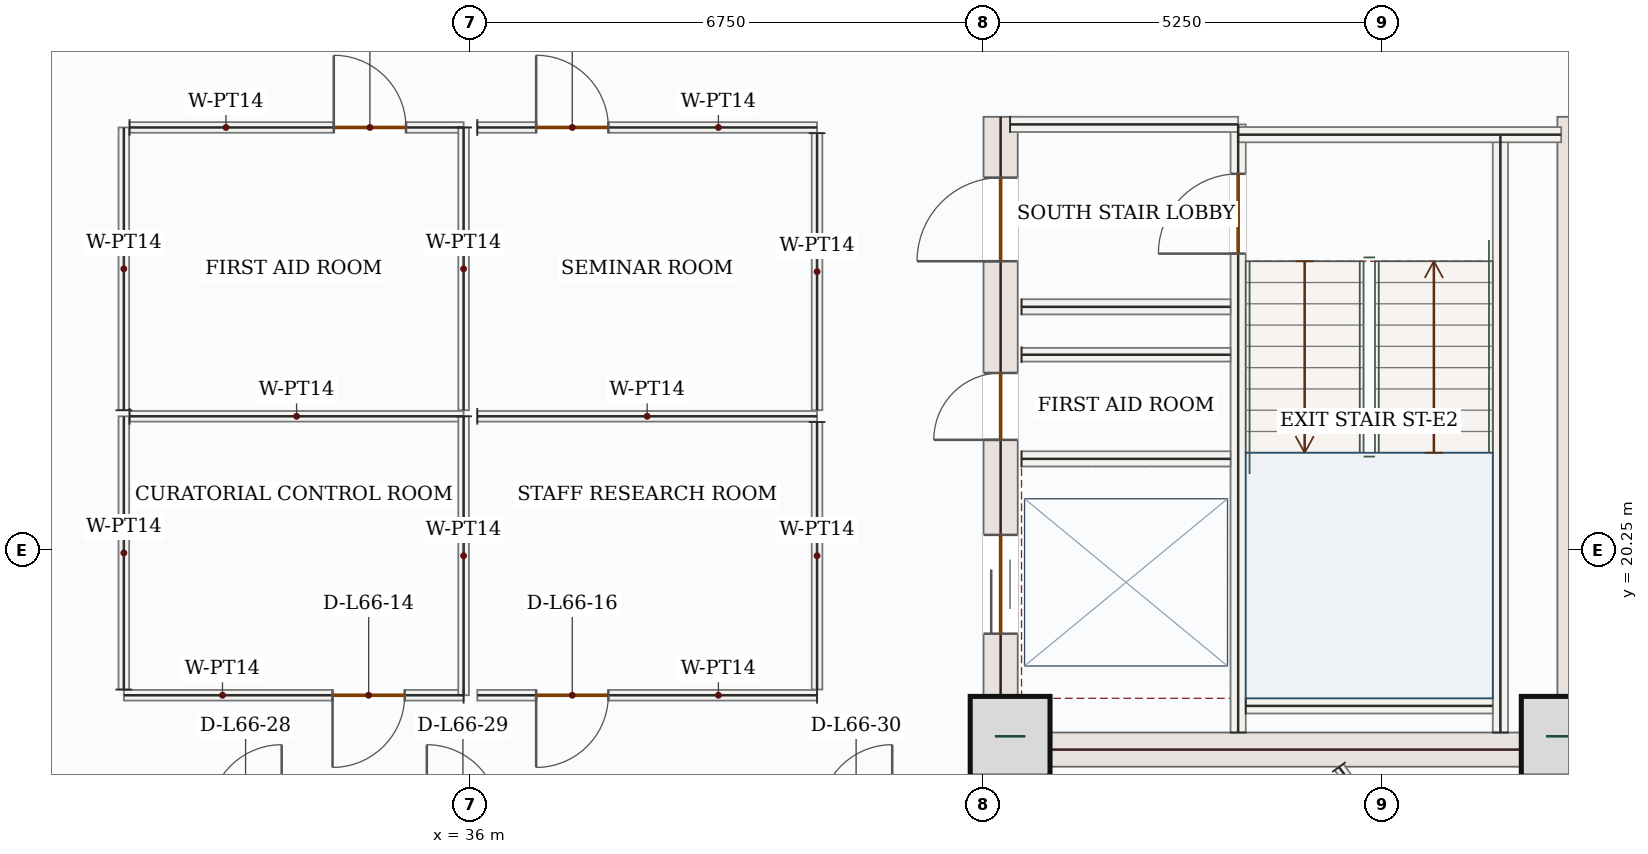
"""IFC4 building model, lengths in metres.
Left out: names, types, materials, properties, quantities, classifications, styles, units other than length and angle.
Written with IfcOpenShell. Run it as: python <this file> out.ifc"""

import sys

from ifc_helpers import new_model, si_unit, direction, frame, frame_2d, origin, origin_2d, place, context, subcontext, project, spatial, rectangle, extrude, source, transform, mapped, element, fill, save


model = new_model("IFC4")
c1 = context("Model", 3, precision=1e-05, world=origin(), true_north=direction((0.0, 1.0)))
c2 = subcontext(c1, "Body", "Model", "MODEL_VIEW")
j1 = project(units=[si_unit("LENGTHUNIT", "METRE"), si_unit("PLANEANGLEUNIT", "RADIAN")], contexts=[c1])
p1 = place(None, origin())
s1 = spatial("IfcSite", under=j1, at=p1, CompositionType="ELEMENT")
p2 = place(p1, origin())
s2 = spatial("IfcBuilding", under=s1, at=p2, CompositionType="ELEMENT")
p3 = place(p2, frame((0.0, 0.0, 276.6)))
s3 = spatial("IfcBuildingStorey", under=s2, at=p3, CompositionType="ELEMENT", Elevation=276.6)
p4 = place(p3, frame((42.975, 17.4, 0.0), z_axis=(0.0, 0.0, 1.0), x_axis=(0.0, 1.0, 0.0)))
e1 = element("IfcWall", 1, at=p4, inside=s3, PredefinedType="SHEAR", context=c2, shape_type="SweptSolid", body=[
    extrude(rectangle(XDim=8.55, YDim=0.45, at=frame_2d((4.275, 0.0))), origin(), (0.0, 0.0, 1.0), 3.5),
])
p5 = place(p4, frame((6.65, 0.0, 0.0)))
e2 = element("IfcOpeningElement", 2, at=p5, cuts=e1, PredefinedType="OPENING", context=c2, shape_type="SweptSolid", body=[
    extrude(rectangle(XDim=1.1, YDim=2.2, at=frame_2d((0.55, 1.1))), frame((0.0, 0.235, 0.0), z_axis=(0.0, -1.0, 0.0), x_axis=(1.0, 0.0, 0.0)), (0.0, 0.0, 1.0), 0.47),
])
p6 = place(p4, frame((1.75, 0.0, 0.0)))
e3 = element("IfcOpeningElement", 3, at=p6, cuts=e1, PredefinedType="OPENING", context=c2, shape_type="SweptSolid", body=[
    extrude(rectangle(XDim=1.3, YDim=2.2, at=frame_2d((0.65, 1.1))), frame((0.0, 0.235, 0.0), z_axis=(0.0, -1.0, 0.0), x_axis=(1.0, 0.0, 0.0)), (0.0, 0.0, 1.0), 0.47),
])
p7 = place(p4, frame((4.3, 0.0, 0.0)))
e4 = element("IfcOpeningElement", 4, at=p7, cuts=e1, PredefinedType="OPENING", context=c2, shape_type="SweptSolid", body=[
    extrude(rectangle(XDim=0.88, YDim=2.1, at=frame_2d((0.44, 1.05))), frame((0.0, 0.235, 0.0), z_axis=(0.0, -1.0, 0.0), x_axis=(1.0, 0.0, 0.0)), (0.0, 0.0, 1.0), 0.47),
])
m1 = source(origin(), c2, "Body", "SweptSolid", [
    extrude(rectangle(XDim=8.55, YDim=0.45, at=frame_2d((4.275, 0.0))), origin(), (0.0, 0.0, 1.0), 3.5),
])
p8 = place(p3, frame((50.525, 17.4, 0.0), z_axis=(0.0, 0.0, 1.0), x_axis=(0.0, 1.0, 0.0)))
e5 = element("IfcWall", 5, at=p8, inside=s3, PredefinedType="SHEAR", context=c2, shape_type="MappedRepresentation", body=[
    mapped(m1, transform((0.0, 0.0, 0.0), x_axis=(1.0, 0.0, 0.0), y_axis=(0.0, 1.0, 0.0), z_axis=(0.0, 0.0, 1.0), scale=1.0)),
])
m2 = source(origin(), c2, "Body", "SweptSolid", [
    extrude(rectangle(XDim=7.1, YDim=0.45, at=frame_2d((3.55, 0.0))), origin(), (0.0, 0.0, 1.0), 3.5),
])
p9 = place(p3, frame((43.2, 17.625, 0.0), z_axis=(0.0, 0.0, 1.0), x_axis=(1.0, 0.0, 0.0)))
e6 = element("IfcWall", 6, at=p9, inside=s3, PredefinedType="SHEAR", context=c2, shape_type="MappedRepresentation", body=[
    mapped(m2, transform((0.0, 0.0, 0.0), x_axis=(1.0, 0.0, 0.0), y_axis=(0.0, 1.0, 0.0), z_axis=(0.0, 0.0, 1.0), scale=1.0)),
])
m3 = source(origin(), c2, "Body", "SweptSolid", [
    extrude(rectangle(XDim=1.05, YDim=1.05, at=origin_2d()), origin(), (0.0, 0.0, 1.0), 3.75),
])
for number, where, z_axis, x_axis in (
    (7, (43.1, 17.8, 0.0), (0.0, 0.0, 1.0), (1.0, 0.0, 0.0)),
    (8, (50.35, 17.8, 0.0), (0.0, 0.0, 1.0), (1.0, 0.0, 0.0)),
):
    element("IfcColumn", number, at=place(p3, frame(where, z_axis=z_axis, x_axis=x_axis)), inside=s3, PredefinedType="COLUMN", context=c2, shape_type="MappedRepresentation", body=[
        mapped(m3, transform((0.0, 0.0, 0.0), x_axis=(1.0, 0.0, 0.0), y_axis=(0.0, 1.0, 0.0), z_axis=(0.0, 0.0, 1.0), scale=1.0)),
    ])
m4 = source(origin(), c2, "Body", "SweptSolid", [
    extrude(rectangle(XDim=7.87, YDim=0.2, at=frame_2d((3.935, 0.0))), origin(), (0.0, 0.0, 1.0), 3.5),
])
p10 = place(p3, frame((49.55, 17.85, 0.0), z_axis=(0.0, 0.0, 1.0), x_axis=(0.0, 1.0, 0.0)))
e9 = element("IfcWall", 9, at=p10, inside=s3, PredefinedType="SOLIDWALL", context=c2, shape_type="MappedRepresentation", body=[
    mapped(m4, transform((0.0, 0.0, 0.0), x_axis=(1.0, 0.0, 0.0), y_axis=(0.0, 1.0, 0.0), z_axis=(0.0, 0.0, 1.0), scale=1.0)),
])
p11 = place(p3, frame((46.1, 17.85, 0.0), z_axis=(0.0, 0.0, 1.0), x_axis=(0.0, 1.0, 0.0)))
e10 = element("IfcWall", 10, at=p11, inside=s3, PredefinedType="SOLIDWALL", context=c2, shape_type="SweptSolid", body=[
    extrude(rectangle(XDim=8.0, YDim=0.2, at=frame_2d((4.0, 0.0))), origin(), (0.0, 0.0, 1.0), 3.5),
])
p12 = place(p11, frame((6.3, 0.0, 0.0)))
e11 = element("IfcOpeningElement", 11, at=p12, cuts=e10, PredefinedType="OPENING", context=c2, shape_type="SweptSolid", body=[
    extrude(rectangle(XDim=1.05, YDim=2.15, at=frame_2d((0.525, 1.075))), frame((0.0, 0.11, 0.0), z_axis=(0.0, -1.0, 0.0), x_axis=(1.0, 0.0, 0.0)), (0.0, 0.0, 1.0), 0.22),
])
m5 = source(origin(), c2, "Body", "SweptSolid", [
    extrude(rectangle(XDim=3.0, YDim=0.2, at=frame_2d((1.5, 0.0))), origin(), (0.0, 0.0, 1.0), 3.5),
])
p13 = place(p3, frame((43.1, 25.85, 0.0), z_axis=(0.0, 0.0, 1.0), x_axis=(1.0, 0.0, 0.0)))
e12 = element("IfcWall", 12, at=p13, inside=s3, PredefinedType="SOLIDWALL", context=c2, shape_type="MappedRepresentation", body=[
    mapped(m5, transform((0.0, 0.0, 0.0), x_axis=(1.0, 0.0, 0.0), y_axis=(0.0, 1.0, 0.0), z_axis=(0.0, 0.0, 1.0), scale=1.0)),
])
m6 = source(origin(), c2, "Body", "SweptSolid", [
    extrude(rectangle(XDim=4.25, YDim=0.2, at=frame_2d((2.125, 0.0))), origin(), (0.0, 0.0, 1.0), 3.5),
])
p14 = place(p3, frame((46.1, 25.715, 0.0), z_axis=(0.0, 0.0, 1.0), x_axis=(1.0, 0.0, 0.0)))
e13 = element("IfcWall", 13, at=p14, inside=s3, PredefinedType="SOLIDWALL", context=c2, shape_type="MappedRepresentation", body=[
    mapped(m6, transform((0.0, 0.0, 0.0), x_axis=(1.0, 0.0, 0.0), y_axis=(0.0, 1.0, 0.0), z_axis=(0.0, 0.0, 1.0), scale=1.0)),
])
m7 = source(origin(), c2, "Body", "SweptSolid", [
    extrude(rectangle(XDim=3.25, YDim=0.2, at=frame_2d((1.625, 0.0))), origin(), (0.0, 0.0, 1.0), 3.5),
])
p15 = place(p3, frame((46.2, 18.2, 0.0), z_axis=(0.0, 0.0, 1.0), x_axis=(1.0, 0.0, 0.0)))
e14 = element("IfcWall", 14, at=p15, inside=s3, PredefinedType="SOLIDWALL", context=c2, shape_type="MappedRepresentation", body=[
    mapped(m7, transform((0.0, 0.0, 0.0), x_axis=(1.0, 0.0, 0.0), y_axis=(0.0, 1.0, 0.0), z_axis=(0.0, 0.0, 1.0), scale=1.0)),
])
m8 = source(origin(), c2, "Body", "SweptSolid", [
    extrude(rectangle(XDim=2.75, YDim=0.2, at=frame_2d((1.375, 0.0))), origin(), (0.0, 0.0, 1.0), 3.5),
])
for number, where, z_axis, x_axis in (
    (15, (43.25, 23.45, 0.0), (0.0, 0.0, 1.0), (1.0, 0.0, 0.0)),
    (16, (43.25, 21.45, 0.0), (0.0, 0.0, 1.0), (1.0, 0.0, 0.0)),
):
    element("IfcWall", number, at=place(p3, frame(where, z_axis=z_axis, x_axis=x_axis)), inside=s3, PredefinedType="SOLIDWALL", context=c2, shape_type="MappedRepresentation", body=[
        mapped(m8, transform((0.0, 0.0, 0.0), x_axis=(1.0, 0.0, 0.0), y_axis=(0.0, 1.0, 0.0), z_axis=(0.0, 0.0, 1.0), scale=1.0)),
    ])
m9 = source(origin(), c2, "Body", "SweptSolid", [
    extrude(rectangle(XDim=2.75, YDim=0.18, at=frame_2d((1.375, 0.0))), origin(), (0.0, 0.0, 1.0), 3.5),
])
p16 = place(p3, frame((43.25, 22.82, 0.0), z_axis=(0.0, 0.0, 1.0), x_axis=(1.0, 0.0, 0.0)))
e17 = element("IfcWall", 17, at=p16, inside=s3, PredefinedType="PARTITIONING", context=c2, shape_type="MappedRepresentation", body=[
    mapped(m9, transform((0.0, 0.0, 0.0), x_axis=(1.0, 0.0, 0.0), y_axis=(0.0, 1.0, 0.0), z_axis=(0.0, 0.0, 1.0), scale=1.0)),
])
p17 = place(p3, frame((35.91, 18.34, 0.0), z_axis=(0.0, 0.0, 1.0), x_axis=(-1.0, 0.0, 0.0)))
e18 = element("IfcWall", 18, at=p17, inside=s3, PredefinedType="PARTITIONING", context=c2, shape_type="SweptSolid", body=[
    extrude(rectangle(XDim=4.47, YDim=0.14, at=frame_2d((2.235, 0.0))), origin(), (0.0, 0.0, 1.0), 3.5),
])
p18 = place(p17, frame((0.774, 0.0, 0.0)))
e19 = element("IfcOpeningElement", 19, at=p18, cuts=e18, PredefinedType="OPENING", context=c2, shape_type="SweptSolid", body=[
    extrude(rectangle(XDim=0.95, YDim=2.15, at=frame_2d((0.475, 1.075))), frame((0.0, 0.08, 0.0), z_axis=(0.0, -1.0, 0.0), x_axis=(1.0, 0.0, 0.0)), (0.0, 0.0, 1.0), 0.16),
])
m10 = source(origin(), c2, "Body", "SweptSolid", [
    extrude(rectangle(XDim=3.595, YDim=0.14, at=frame_2d((1.797, 0.0))), origin(), (0.0, 0.0, 1.0), 3.5),
])
p19 = place(p3, frame((31.44, 18.415, 0.0), z_axis=(0.0, 0.0, 1.0), x_axis=(0.0, 1.0, 0.0)))
e20 = element("IfcWall", 20, at=p19, inside=s3, PredefinedType="PARTITIONING", context=c2, shape_type="MappedRepresentation", body=[
    mapped(m10, transform((0.0, 0.0, 0.0), x_axis=(1.0, 0.0, 0.0), y_axis=(0.0, 1.0, 0.0), z_axis=(0.0, 0.0, 1.0), scale=1.0)),
])
m11 = source(origin(), c2, "Body", "SweptSolid", [
    extrude(rectangle(XDim=4.395, YDim=0.14, at=frame_2d((2.198, 0.0))), origin(), (0.0, 0.0, 1.0), 3.5),
])
p20 = place(p3, frame((31.515, 22.01, 0.0), z_axis=(0.0, 0.0, 1.0), x_axis=(1.0, 0.0, 0.0)))
e21 = element("IfcWall", 21, at=p20, inside=s3, PredefinedType="PARTITIONING", context=c2, shape_type="MappedRepresentation", body=[
    mapped(m11, transform((0.0, 0.0, 0.0), x_axis=(1.0, 0.0, 0.0), y_axis=(0.0, 1.0, 0.0), z_axis=(0.0, 0.0, 1.0), scale=1.0)),
])
m12 = source(origin(), c2, "Body", "SweptSolid", [
    extrude(rectangle(XDim=3.67, YDim=0.14, at=frame_2d((1.835, 0.0))), origin(), (0.0, 0.0, 1.0), 3.5),
])
p21 = place(p3, frame((35.91, 22.01, 0.0), z_axis=(0.0, 0.0, 1.0), x_axis=(0.0, -1.0, 0.0)))
e22 = element("IfcWall", 22, at=p21, inside=s3, PredefinedType="PARTITIONING", context=c2, shape_type="MappedRepresentation", body=[
    mapped(m12, transform((0.0, 0.0, 0.0), x_axis=(1.0, 0.0, 0.0), y_axis=(0.0, 1.0, 0.0), z_axis=(0.0, 0.0, 1.0), scale=1.0)),
])
p22 = place(p3, frame((40.56, 18.34, 0.0), z_axis=(0.0, 0.0, 1.0), x_axis=(-1.0, 0.0, 0.0)))
e23 = element("IfcWall", 23, at=p22, inside=s3, PredefinedType="PARTITIONING", context=c2, shape_type="SweptSolid", body=[
    extrude(rectangle(XDim=4.47, YDim=0.14, at=frame_2d((2.235, 0.0))), origin(), (0.0, 0.0, 1.0), 3.5),
])
p23 = place(p22, frame((2.746, 0.0, 0.0)))
e24 = element("IfcOpeningElement", 24, at=p23, cuts=e23, PredefinedType="OPENING", context=c2, shape_type="SweptSolid", body=[
    extrude(rectangle(XDim=0.95, YDim=2.15, at=frame_2d((0.475, 1.075))), frame((0.0, 0.08, 0.0), z_axis=(0.0, -1.0, 0.0), x_axis=(1.0, 0.0, 0.0)), (0.0, 0.0, 1.0), 0.16),
])
m13 = source(origin(), c2, "Body", "SweptSolid", [
    extrude(rectangle(XDim=4.47, YDim=0.14, at=frame_2d((2.235, 0.0))), origin(), (0.0, 0.0, 1.0), 3.5),
])
p24 = place(p3, frame((36.09, 22.01, 0.0), z_axis=(0.0, 0.0, 1.0), x_axis=(1.0, 0.0, 0.0)))
e25 = element("IfcWall", 25, at=p24, inside=s3, PredefinedType="PARTITIONING", context=c2, shape_type="MappedRepresentation", body=[
    mapped(m13, transform((0.0, 0.0, 0.0), x_axis=(1.0, 0.0, 0.0), y_axis=(0.0, 1.0, 0.0), z_axis=(0.0, 0.0, 1.0), scale=1.0)),
])
m14 = source(origin(), c2, "Body", "SweptSolid", [
    extrude(rectangle(XDim=3.52, YDim=0.14, at=frame_2d((1.76, 0.0))), origin(), (0.0, 0.0, 1.0), 3.5),
])
p25 = place(p3, frame((40.56, 21.935, 0.0), z_axis=(0.0, 0.0, 1.0), x_axis=(0.0, -1.0, 0.0)))
e26 = element("IfcWall", 26, at=p25, inside=s3, PredefinedType="PARTITIONING", context=c2, shape_type="MappedRepresentation", body=[
    mapped(m14, transform((0.0, 0.0, 0.0), x_axis=(1.0, 0.0, 0.0), y_axis=(0.0, 1.0, 0.0), z_axis=(0.0, 0.0, 1.0), scale=1.0)),
])
m15 = source(origin(), c2, "Body", "SweptSolid", [
    extrude(rectangle(XDim=3.72, YDim=0.14, at=frame_2d((1.86, 0.0))), origin(), (0.0, 0.0, 1.0), 3.5),
])
p26 = place(p3, frame((31.44, 22.09, 0.0), z_axis=(0.0, 0.0, 1.0), x_axis=(0.0, 1.0, 0.0)))
e27 = element("IfcWall", 27, at=p26, inside=s3, PredefinedType="PARTITIONING", context=c2, shape_type="MappedRepresentation", body=[
    mapped(m15, transform((0.0, 0.0, 0.0), x_axis=(1.0, 0.0, 0.0), y_axis=(0.0, 1.0, 0.0), z_axis=(0.0, 0.0, 1.0), scale=1.0)),
])
p27 = place(p3, frame((31.515, 25.81, 0.0), z_axis=(0.0, 0.0, 1.0), x_axis=(1.0, 0.0, 0.0)))
e28 = element("IfcWall", 28, at=p27, inside=s3, PredefinedType="PARTITIONING", context=c2, shape_type="SweptSolid", body=[
    extrude(rectangle(XDim=4.395, YDim=0.14, at=frame_2d((2.198, 0.0))), origin(), (0.0, 0.0, 1.0), 3.5),
])
p28 = place(p27, frame((2.687, 0.0, 0.0)))
e29 = element("IfcOpeningElement", 29, at=p28, cuts=e28, PredefinedType="OPENING", context=c2, shape_type="SweptSolid", body=[
    extrude(rectangle(XDim=0.95, YDim=2.15, at=frame_2d((0.475, 1.075))), frame((0.0, 0.08, 0.0), z_axis=(0.0, -1.0, 0.0), x_axis=(1.0, 0.0, 0.0)), (0.0, 0.0, 1.0), 0.16),
])
p29 = place(p3, frame((35.91, 25.81, 0.0), z_axis=(0.0, 0.0, 1.0), x_axis=(0.0, -1.0, 0.0)))
e30 = element("IfcWall", 30, at=p29, inside=s3, PredefinedType="PARTITIONING", context=c2, shape_type="MappedRepresentation", body=[
    mapped(m15, transform((0.0, 0.0, 0.0), x_axis=(1.0, 0.0, 0.0), y_axis=(0.0, 1.0, 0.0), z_axis=(0.0, 0.0, 1.0), scale=1.0)),
])
p30 = place(p3, frame((36.09, 25.81, 0.0), z_axis=(0.0, 0.0, 1.0), x_axis=(1.0, 0.0, 0.0)))
e31 = element("IfcWall", 31, at=p30, inside=s3, PredefinedType="PARTITIONING", context=c2, shape_type="SweptSolid", body=[
    extrude(rectangle(XDim=4.47, YDim=0.14, at=frame_2d((2.235, 0.0))), origin(), (0.0, 0.0, 1.0), 3.5),
])
p31 = place(p30, frame((0.774, 0.0, 0.0)))
e32 = element("IfcOpeningElement", 32, at=p31, cuts=e31, PredefinedType="OPENING", context=c2, shape_type="SweptSolid", body=[
    extrude(rectangle(XDim=0.95, YDim=2.15, at=frame_2d((0.475, 1.075))), frame((0.0, 0.08, 0.0), z_axis=(0.0, -1.0, 0.0), x_axis=(1.0, 0.0, 0.0)), (0.0, 0.0, 1.0), 0.16),
])
m16 = source(origin(), c2, "Body", "SweptSolid", [
    extrude(rectangle(XDim=3.645, YDim=0.14, at=frame_2d((1.823, 0.0))), origin(), (0.0, 0.0, 1.0), 3.5),
])
p32 = place(p3, frame((40.56, 25.735, 0.0), z_axis=(0.0, 0.0, 1.0), x_axis=(0.0, -1.0, 0.0)))
e33 = element("IfcWall", 33, at=p32, inside=s3, PredefinedType="PARTITIONING", context=c2, shape_type="MappedRepresentation", body=[
    mapped(m16, transform((0.0, 0.0, 0.0), x_axis=(1.0, 0.0, 0.0), y_axis=(0.0, 1.0, 0.0), z_axis=(0.0, 0.0, 1.0), scale=1.0)),
])
m17 = source(origin(), c2, "Body", "SweptSolid", [
    extrude(rectangle(XDim=2.013, YDim=0.14, at=frame_2d((1.006, 0.0))), origin(), (0.0, 0.0, 1.0), 3.5),
])
p33 = place(p3, frame((47.427, 17.395, 0.0), z_axis=(0.0, 0.0, 1.0), x_axis=(0.592698341467, -0.80542453155, 0.0)))
e34 = element("IfcWall", 34, at=p33, inside=s3, PredefinedType="PARTITIONING", context=c2, shape_type="MappedRepresentation", body=[
    mapped(m17, transform((0.0, 0.0, 0.0), x_axis=(1.0, 0.0, 0.0), y_axis=(0.0, 1.0, 0.0), z_axis=(0.0, 0.0, 1.0), scale=1.0)),
])
m18 = source(origin(), c2, "Body", "SweptSolid", [
    extrude(rectangle(XDim=1.05, YDim=2.15, at=frame_2d((0.525, 1.075))), frame((0.0, 0.025, 0.0), z_axis=(0.0, -1.0, 0.0), x_axis=(1.0, 0.0, 0.0)), (0.0, 0.0, 1.0), 0.05),
])
p34 = place(p12, origin())
e35 = element("IfcDoor", 35, at=p34, inside=s3, OperationType="SINGLE_SWING_LEFT", PredefinedType="DOOR", context=c2, shape_type="MappedRepresentation", body=[
    mapped(m18, transform((0.0, 0.0, 0.0), x_axis=(1.0, 0.0, 0.0), y_axis=(0.0, 1.0, 0.0), z_axis=(0.0, 0.0, 1.0), scale=1.0)),
])
fill(e11, e35)
m19 = source(origin(), c2, "Body", "SweptSolid", [
    extrude(rectangle(XDim=1.1, YDim=2.2, at=frame_2d((0.55, 1.1))), frame((0.0, 0.025, 0.0), z_axis=(0.0, -1.0, 0.0), x_axis=(1.0, 0.0, 0.0)), (0.0, 0.0, 1.0), 0.05),
])
p35 = place(p5, origin())
e36 = element("IfcDoor", 36, at=p35, inside=s3, OperationType="SINGLE_SWING_LEFT", PredefinedType="DOOR", context=c2, shape_type="MappedRepresentation", body=[
    mapped(m19, transform((0.0, 0.0, 0.0), x_axis=(1.0, 0.0, 0.0), y_axis=(0.0, 1.0, 0.0), z_axis=(0.0, 0.0, 1.0), scale=1.0)),
])
fill(e2, e36)
m20 = source(origin(), c2, "Body", "SweptSolid", [
    extrude(rectangle(XDim=1.3, YDim=2.2, at=frame_2d((0.65, 1.1))), frame((0.0, 0.025, 0.0), z_axis=(0.0, -1.0, 0.0), x_axis=(1.0, 0.0, 0.0)), (0.0, 0.0, 1.0), 0.05),
])
p36 = place(p6, origin())
e37 = element("IfcDoor", 37, at=p36, inside=s3, OperationType="DOUBLE_DOOR_SLIDING", PredefinedType="DOOR", context=c2, shape_type="MappedRepresentation", body=[
    mapped(m20, transform((0.0, 0.0, 0.0), x_axis=(1.0, 0.0, 0.0), y_axis=(0.0, 1.0, 0.0), z_axis=(0.0, 0.0, 1.0), scale=1.0)),
])
fill(e3, e37)
m21 = source(origin(), c2, "Body", "SweptSolid", [
    extrude(rectangle(XDim=0.88, YDim=2.1, at=frame_2d((0.44, 1.05))), frame((0.0, 0.025, 0.0), z_axis=(0.0, -1.0, 0.0), x_axis=(1.0, 0.0, 0.0)), (0.0, 0.0, 1.0), 0.05),
])
p37 = place(p7, origin())
e38 = element("IfcDoor", 38, at=p37, inside=s3, OperationType="SINGLE_SWING_LEFT", PredefinedType="DOOR", context=c2, shape_type="MappedRepresentation", body=[
    mapped(m21, transform((0.0, 0.0, 0.0), x_axis=(1.0, 0.0, 0.0), y_axis=(0.0, 1.0, 0.0), z_axis=(0.0, 0.0, 1.0), scale=1.0)),
])
fill(e4, e38)
m22 = source(origin(), c2, "Body", "SweptSolid", [
    extrude(rectangle(XDim=0.95, YDim=2.15, at=frame_2d((0.475, 1.075))), frame((0.0, 0.025, 0.0), z_axis=(0.0, -1.0, 0.0), x_axis=(1.0, 0.0, 0.0)), (0.0, 0.0, 1.0), 0.05),
])
p38 = place(p18, origin())
e39 = element("IfcDoor", 39, at=p38, inside=s3, OperationType="SINGLE_SWING_RIGHT", PredefinedType="DOOR", context=c2, shape_type="MappedRepresentation", body=[
    mapped(m22, transform((0.0, 0.0, 0.0), x_axis=(1.0, 0.0, 0.0), y_axis=(0.0, 1.0, 0.0), z_axis=(0.0, 0.0, 1.0), scale=1.0)),
])
fill(e19, e39)
p39 = place(p28, origin())
e40 = element("IfcDoor", 40, at=p39, inside=s3, OperationType="SINGLE_SWING_LEFT", PredefinedType="DOOR", context=c2, shape_type="MappedRepresentation", body=[
    mapped(m22, transform((0.0, 0.0, 0.0), x_axis=(1.0, 0.0, 0.0), y_axis=(0.0, 1.0, 0.0), z_axis=(0.0, 0.0, 1.0), scale=1.0)),
])
fill(e29, e40)
p40 = place(p23, origin())
e41 = element("IfcDoor", 41, at=p40, inside=s3, OperationType="SINGLE_SWING_RIGHT", PredefinedType="DOOR", context=c2, shape_type="MappedRepresentation", body=[
    mapped(m22, transform((0.0, 0.0, 0.0), x_axis=(1.0, 0.0, 0.0), y_axis=(0.0, 1.0, 0.0), z_axis=(0.0, 0.0, 1.0), scale=1.0)),
])
fill(e24, e41)
p41 = place(p31, origin())
e42 = element("IfcDoor", 42, at=p41, inside=s3, OperationType="SINGLE_SWING_LEFT", PredefinedType="DOOR", context=c2, shape_type="MappedRepresentation", body=[
    mapped(m22, transform((0.0, 0.0, 0.0), x_axis=(1.0, 0.0, 0.0), y_axis=(0.0, 1.0, 0.0), z_axis=(0.0, 0.0, 1.0), scale=1.0)),
])
fill(e32, e42)
save(model, sys.argv[1])
